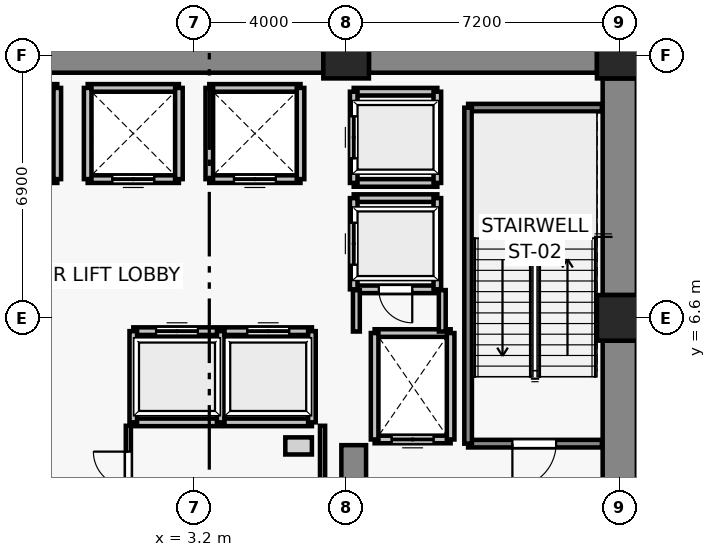
"""IFC4 building model, lengths in metres.
Left out: names, types, materials, properties, quantities, classifications, styles, units other than length and angle.
Written with IfcOpenShell. Run it as: python <this file> out.ifc"""

import sys

from ifc_helpers import new_model, si_unit, direction, frame, frame_2d, origin, origin_2d, place, context, subcontext, project, spatial, rectangle, extrude, source, transform, mapped, element, fill, save


model = new_model("IFC4")
c1 = context("Model", 3, precision=1e-05, world=origin(), true_north=direction((0.0, 1.0)))
c2 = subcontext(c1, "Body", "Model", "MODEL_VIEW")
j1 = project(units=[si_unit("LENGTHUNIT", "METRE"), si_unit("PLANEANGLEUNIT", "RADIAN")], contexts=[c1])
p1 = place(None, origin())
s1 = spatial("IfcSite", under=j1, at=p1, CompositionType="ELEMENT")
p2 = place(p1, origin())
s2 = spatial("IfcBuilding", under=s1, at=p2, CompositionType="ELEMENT")
p3 = place(p2, origin())
s3 = spatial("IfcBuildingStorey", under=s2, at=p3, CompositionType="ELEMENT", Elevation=0.0)
for number, where, z_axis, x_axis in (
    (1, (14.4, 6.6, 0.0), (0.0, 0.0, 1.0), (1.0, 0.0, 0.0)),
    (2, (7.2, 13.5, 0.0), (0.0, 0.0, 1.0), (1.0, 0.0, 0.0)),
    (3, (14.4, 13.5, 0.0), (0.0, 0.0, 1.0), (1.0, 0.0, 0.0)),
):
    element("IfcColumn", number, at=place(p3, frame(where, z_axis=z_axis, x_axis=x_axis)), inside=s3, PredefinedType="COLUMN", context=c2, shape_type="SweptSolid", body=[
        extrude(rectangle(XDim=1.2, YDim=1.2, at=origin_2d()), origin(), (0.0, 0.0, 1.0), 5.0),
    ])
p4 = place(p3, frame((-6.6, 13.5, 0.0), z_axis=(0.0, 0.0, 1.0), x_axis=(1.0, 0.0, 0.0)))
e4 = element("IfcWall", 4, at=p4, inside=s3, PredefinedType="SHEAR", context=c2, shape_type="SweptSolid", body=[
    extrude(rectangle(XDim=13.2, YDim=0.9, at=frame_2d((6.6, 0.0))), origin(), (0.0, 0.0, 1.0), 4.7),
])
p5 = place(p3, frame((7.8, 13.5, 0.0), z_axis=(0.0, 0.0, 1.0), x_axis=(1.0, 0.0, 0.0)))
e5 = element("IfcWall", 5, at=p5, inside=s3, PredefinedType="SHEAR", context=c2, shape_type="SweptSolid", body=[
    extrude(rectangle(XDim=6.0, YDim=0.9, at=frame_2d((3.0, 0.0))), origin(), (0.0, 0.0, 1.0), 4.7),
])
p6 = place(p3, frame((14.4, -0.6, 0.0), z_axis=(0.0, 0.0, 1.0), x_axis=(0.0, 1.0, 0.0)))
e6 = element("IfcWall", 6, at=p6, inside=s3, PredefinedType="SHEAR", context=c2, shape_type="SweptSolid", body=[
    extrude(rectangle(XDim=6.6, YDim=0.9, at=frame_2d((3.3, 0.0))), origin(), (0.0, 0.0, 1.0), 4.7),
])
p7 = place(p3, frame((14.4, 7.2, 0.0), z_axis=(0.0, 0.0, 1.0), x_axis=(0.0, 1.0, 0.0)))
e7 = element("IfcWall", 7, at=p7, inside=s3, PredefinedType="SHEAR", context=c2, shape_type="SweptSolid", body=[
    extrude(rectangle(XDim=5.7, YDim=0.9, at=frame_2d((2.85, 0.0))), origin(), (0.0, 0.0, 1.0), 4.7),
])
p8 = place(p3, frame((7.4, -0.75, 0.0), z_axis=(0.0, 0.0, 1.0), x_axis=(0.0, 1.0, 0.0)))
e8 = element("IfcWall", 8, at=p8, inside=s3, PredefinedType="SHEAR", context=c2, shape_type="SweptSolid", body=[
    extrude(rectangle(XDim=4.0, YDim=0.65, at=frame_2d((2.0, 0.0))), origin(), (0.0, 0.0, 1.0), 4.7),
])
p9 = place(p3, frame((9.95, 3.4, 0.0), z_axis=(0.0, 0.0, 1.0), x_axis=(-1.0, 0.0, 0.0)))
e9 = element("IfcWall", 9, at=p9, inside=s3, PredefinedType="SOLIDWALL", context=c2, shape_type="SweptSolid", body=[
    extrude(rectangle(XDim=2.0, YDim=0.2, at=frame_2d((1.0, 0.0))), origin(), (0.0, 0.0, 1.0), 4.7),
])
p10 = place(p9, frame((0.45, 0.0, 0.0)))
e10 = element("IfcOpeningElement", 10, at=p10, cuts=e9, PredefinedType="OPENING", context=c2, shape_type="SweptSolid", body=[
    extrude(rectangle(XDim=1.1, YDim=2.2, at=frame_2d((0.55, 1.1))), frame((0.0, 0.11, 0.0), z_axis=(0.0, -1.0, 0.0), x_axis=(1.0, 0.0, 0.0)), (0.0, 0.0, 1.0), 0.22),
])
p11 = place(p3, frame((7.95, 6.2, 0.0), z_axis=(0.0, 0.0, 1.0), x_axis=(1.0, 0.0, 0.0)))
e11 = element("IfcWall", 11, at=p11, inside=s3, PredefinedType="SOLIDWALL", context=c2, shape_type="SweptSolid", body=[
    extrude(rectangle(XDim=2.0, YDim=0.2, at=frame_2d((1.0, 0.0))), origin(), (0.0, 0.0, 1.0), 4.7),
])
for number, where, z_axis, x_axis in (
    (12, (7.95, 3.4, 0.0), (0.0, 0.0, 1.0), (0.0, 1.0, 0.0)),
    (13, (9.95, 6.2, 0.0), (0.0, 0.0, 1.0), (0.0, -1.0, 0.0)),
):
    element("IfcWall", number, at=place(p3, frame(where, z_axis=z_axis, x_axis=x_axis)), inside=s3, PredefinedType="SOLIDWALL", context=c2, shape_type="SweptSolid", body=[
        extrude(rectangle(XDim=2.8, YDim=0.2, at=frame_2d((1.4, 0.0))), origin(), (0.0, 0.0, 1.0), 4.7),
    ])
p12 = place(p3, frame((-0.4, 10.25, 0.0), z_axis=(0.0, 0.0, 1.0), x_axis=(-1.0, 0.0, 0.0)))
e14 = element("IfcWall", 14, at=p12, inside=s3, PredefinedType="SOLIDWALL", context=c2, shape_type="SweptSolid", body=[
    extrude(rectangle(XDim=2.4, YDim=0.2, at=frame_2d((1.2, 0.0))), origin(), (0.0, 0.0, 1.0), 4.7),
])
p13 = place(p12, frame((0.65, 0.0, 0.0)))
e15 = element("IfcOpeningElement", 15, at=p13, cuts=e14, PredefinedType="OPENING", context=c2, shape_type="SweptSolid", body=[
    extrude(rectangle(XDim=1.1, YDim=2.2, at=frame_2d((0.55, 1.1))), frame((0.0, 0.11, 0.0), z_axis=(0.0, -1.0, 0.0), x_axis=(1.0, 0.0, 0.0)), (0.0, 0.0, 1.0), 0.22),
])
p14 = place(p3, frame((-2.8, 12.65, 0.0), z_axis=(0.0, 0.0, 1.0), x_axis=(1.0, 0.0, 0.0)))
e16 = element("IfcWall", 16, at=p14, inside=s3, PredefinedType="SOLIDWALL", context=c2, shape_type="SweptSolid", body=[
    extrude(rectangle(XDim=2.4, YDim=0.2, at=frame_2d((1.2, 0.0))), origin(), (0.0, 0.0, 1.0), 4.7),
])
p15 = place(p3, frame((-0.4, 12.65, 0.0), z_axis=(0.0, 0.0, 1.0), x_axis=(0.0, -1.0, 0.0)))
e17 = element("IfcWall", 17, at=p15, inside=s3, PredefinedType="SOLIDWALL", context=c2, shape_type="SweptSolid", body=[
    extrude(rectangle(XDim=2.4, YDim=0.2, at=frame_2d((1.2, 0.0))), origin(), (0.0, 0.0, 1.0), 4.7),
])
p16 = place(p3, frame((2.8, 10.25, 0.0), z_axis=(0.0, 0.0, 1.0), x_axis=(-1.0, 0.0, 0.0)))
e18 = element("IfcWall", 18, at=p16, inside=s3, PredefinedType="SOLIDWALL", context=c2, shape_type="SweptSolid", body=[
    extrude(rectangle(XDim=2.4, YDim=0.2, at=frame_2d((1.2, 0.0))), origin(), (0.0, 0.0, 1.0), 4.7),
])
p17 = place(p16, frame((0.65, 0.0, 0.0)))
e19 = element("IfcOpeningElement", 19, at=p17, cuts=e18, PredefinedType="OPENING", context=c2, shape_type="SweptSolid", body=[
    extrude(rectangle(XDim=1.1, YDim=2.2, at=frame_2d((0.55, 1.1))), frame((0.0, 0.11, 0.0), z_axis=(0.0, -1.0, 0.0), x_axis=(1.0, 0.0, 0.0)), (0.0, 0.0, 1.0), 0.22),
])
p18 = place(p3, frame((0.4, 12.65, 0.0), z_axis=(0.0, 0.0, 1.0), x_axis=(1.0, 0.0, 0.0)))
e20 = element("IfcWall", 20, at=p18, inside=s3, PredefinedType="SOLIDWALL", context=c2, shape_type="SweptSolid", body=[
    extrude(rectangle(XDim=2.4, YDim=0.2, at=frame_2d((1.2, 0.0))), origin(), (0.0, 0.0, 1.0), 4.7),
])
for number, where, z_axis, x_axis in (
    (21, (0.4, 10.25, 0.0), (0.0, 0.0, 1.0), (0.0, 1.0, 0.0)),
    (22, (2.8, 12.65, 0.0), (0.0, 0.0, 1.0), (0.0, -1.0, 0.0)),
):
    element("IfcWall", number, at=place(p3, frame(where, z_axis=z_axis, x_axis=x_axis)), inside=s3, PredefinedType="SOLIDWALL", context=c2, shape_type="SweptSolid", body=[
        extrude(rectangle(XDim=2.4, YDim=0.2, at=frame_2d((1.2, 0.0))), origin(), (0.0, 0.0, 1.0), 4.7),
    ])
p19 = place(p3, frame((6.0, 10.25, 0.0), z_axis=(0.0, 0.0, 1.0), x_axis=(-1.0, 0.0, 0.0)))
e23 = element("IfcWall", 23, at=p19, inside=s3, PredefinedType="SOLIDWALL", context=c2, shape_type="SweptSolid", body=[
    extrude(rectangle(XDim=2.4, YDim=0.2, at=frame_2d((1.2, 0.0))), origin(), (0.0, 0.0, 1.0), 4.7),
])
p20 = place(p19, frame((0.65, 0.0, 0.0)))
e24 = element("IfcOpeningElement", 24, at=p20, cuts=e23, PredefinedType="OPENING", context=c2, shape_type="SweptSolid", body=[
    extrude(rectangle(XDim=1.1, YDim=2.2, at=frame_2d((0.55, 1.1))), frame((0.0, 0.11, 0.0), z_axis=(0.0, -1.0, 0.0), x_axis=(1.0, 0.0, 0.0)), (0.0, 0.0, 1.0), 0.22),
])
for number, where, z_axis, x_axis in (
    (25, (3.6, 12.65, 0.0), (0.0, 0.0, 1.0), (1.0, 0.0, 0.0)),
    (26, (3.6, 10.25, 0.0), (0.0, 0.0, 1.0), (0.0, 1.0, 0.0)),
    (27, (6.0, 12.65, 0.0), (0.0, 0.0, 1.0), (0.0, -1.0, 0.0)),
):
    element("IfcWall", number, at=place(p3, frame(where, z_axis=z_axis, x_axis=x_axis)), inside=s3, PredefinedType="SOLIDWALL", context=c2, shape_type="SweptSolid", body=[
        extrude(rectangle(XDim=2.4, YDim=0.2, at=frame_2d((1.2, 0.0))), origin(), (0.0, 0.0, 1.0), 4.7),
    ])
p21 = place(p3, frame((3.9, 3.85, 0.0), z_axis=(0.0, 0.0, 1.0), x_axis=(-1.0, 0.0, 0.0)))
e28 = element("IfcWall", 28, at=p21, inside=s3, PredefinedType="SOLIDWALL", context=c2, shape_type="SweptSolid", body=[
    extrude(rectangle(XDim=2.3, YDim=0.2, at=frame_2d((1.15, 0.0))), origin(), (0.0, 0.0, 1.0), 4.7),
])
p22 = place(p3, frame((1.6, 6.25, 0.0), z_axis=(0.0, 0.0, 1.0), x_axis=(1.0, 0.0, 0.0)))
e29 = element("IfcWall", 29, at=p22, inside=s3, PredefinedType="SOLIDWALL", context=c2, shape_type="SweptSolid", body=[
    extrude(rectangle(XDim=2.3, YDim=0.2, at=frame_2d((1.15, 0.0))), origin(), (0.0, 0.0, 1.0), 4.7),
])
p23 = place(p22, frame((0.6, 0.0, 0.0)))
e30 = element("IfcOpeningElement", 30, at=p23, cuts=e29, PredefinedType="OPENING", context=c2, shape_type="SweptSolid", body=[
    extrude(rectangle(XDim=1.1, YDim=2.2, at=frame_2d((0.55, 1.1))), frame((0.0, 0.11, 0.0), z_axis=(0.0, -1.0, 0.0), x_axis=(1.0, 0.0, 0.0)), (0.0, 0.0, 1.0), 0.22),
])
for number, where, z_axis, x_axis in (
    (31, (1.6, 3.85, 0.0), (0.0, 0.0, 1.0), (0.0, 1.0, 0.0)),
    (32, (3.9, 6.25, 0.0), (0.0, 0.0, 1.0), (0.0, -1.0, 0.0)),
):
    element("IfcWall", number, at=place(p3, frame(where, z_axis=z_axis, x_axis=x_axis)), inside=s3, PredefinedType="SOLIDWALL", context=c2, shape_type="SweptSolid", body=[
        extrude(rectangle(XDim=2.4, YDim=0.2, at=frame_2d((1.2, 0.0))), origin(), (0.0, 0.0, 1.0), 4.7),
    ])
p24 = place(p3, frame((6.3, 3.85, 0.0), z_axis=(0.0, 0.0, 1.0), x_axis=(-1.0, 0.0, 0.0)))
e33 = element("IfcWall", 33, at=p24, inside=s3, PredefinedType="SOLIDWALL", context=c2, shape_type="SweptSolid", body=[
    extrude(rectangle(XDim=2.3, YDim=0.2, at=frame_2d((1.15, 0.0))), origin(), (0.0, 0.0, 1.0), 4.7),
])
p25 = place(p3, frame((4.0, 6.25, 0.0), z_axis=(0.0, 0.0, 1.0), x_axis=(1.0, 0.0, 0.0)))
e34 = element("IfcWall", 34, at=p25, inside=s3, PredefinedType="SOLIDWALL", context=c2, shape_type="SweptSolid", body=[
    extrude(rectangle(XDim=2.3, YDim=0.2, at=frame_2d((1.15, 0.0))), origin(), (0.0, 0.0, 1.0), 4.7),
])
p26 = place(p25, frame((0.6, 0.0, 0.0)))
e35 = element("IfcOpeningElement", 35, at=p26, cuts=e34, PredefinedType="OPENING", context=c2, shape_type="SweptSolid", body=[
    extrude(rectangle(XDim=1.1, YDim=2.2, at=frame_2d((0.55, 1.1))), frame((0.0, 0.11, 0.0), z_axis=(0.0, -1.0, 0.0), x_axis=(1.0, 0.0, 0.0)), (0.0, 0.0, 1.0), 0.22),
])
p27 = place(p3, frame((6.3, 6.25, 0.0), z_axis=(0.0, 0.0, 1.0), x_axis=(0.0, -1.0, 0.0)))
e36 = element("IfcWall", 36, at=p27, inside=s3, PredefinedType="SOLIDWALL", context=c2, shape_type="SweptSolid", body=[
    extrude(rectangle(XDim=2.4, YDim=0.2, at=frame_2d((1.2, 0.0))), origin(), (0.0, 0.0, 1.0), 4.7),
])
p28 = place(p3, frame((9.6, 7.35, 0.0), z_axis=(0.0, 0.0, 1.0), x_axis=(-1.0, 0.0, 0.0)))
e37 = element("IfcWall", 37, at=p28, inside=s3, PredefinedType="SOLIDWALL", context=c2, shape_type="SweptSolid", body=[
    extrude(rectangle(XDim=2.2, YDim=0.2, at=frame_2d((1.1, 0.0))), origin(), (0.0, 0.0, 1.0), 3.79),
])
p29 = place(p28, frame((0.66, 0.0, 0.0)))
e38 = element("IfcOpeningElement", 38, at=p29, cuts=e37, PredefinedType="OPENING", context=c2, shape_type="SweptSolid", body=[
    extrude(rectangle(XDim=0.88, YDim=2.1, at=frame_2d((0.44, 1.05))), frame((0.0, 0.11, 0.0), z_axis=(0.0, -1.0, 0.0), x_axis=(1.0, 0.0, 0.0)), (0.0, 0.0, 1.0), 0.22),
])
p30 = place(p3, frame((7.4, 9.75, 0.0), z_axis=(0.0, 0.0, 1.0), x_axis=(1.0, 0.0, 0.0)))
e39 = element("IfcWall", 39, at=p30, inside=s3, PredefinedType="SOLIDWALL", context=c2, shape_type="SweptSolid", body=[
    extrude(rectangle(XDim=2.2, YDim=0.2, at=frame_2d((1.1, 0.0))), origin(), (0.0, 0.0, 1.0), 3.79),
])
p31 = place(p3, frame((7.4, 7.35, 0.0), z_axis=(0.0, 0.0, 1.0), x_axis=(0.0, 1.0, 0.0)))
e40 = element("IfcWall", 40, at=p31, inside=s3, PredefinedType="SOLIDWALL", context=c2, shape_type="SweptSolid", body=[
    extrude(rectangle(XDim=2.4, YDim=0.2, at=frame_2d((1.2, 0.0))), origin(), (0.0, 0.0, 1.0), 3.79),
])
p32 = place(p31, frame((0.65, 0.0, 0.0)))
e41 = element("IfcOpeningElement", 41, at=p32, cuts=e40, PredefinedType="OPENING", context=c2, shape_type="SweptSolid", body=[
    extrude(rectangle(XDim=1.1, YDim=2.2, at=frame_2d((0.55, 1.1))), frame((0.0, 0.11, 0.0), z_axis=(0.0, -1.0, 0.0), x_axis=(1.0, 0.0, 0.0)), (0.0, 0.0, 1.0), 0.22),
])
p33 = place(p3, frame((9.6, 9.75, 0.0), z_axis=(0.0, 0.0, 1.0), x_axis=(0.0, -1.0, 0.0)))
e42 = element("IfcWall", 42, at=p33, inside=s3, PredefinedType="SOLIDWALL", context=c2, shape_type="SweptSolid", body=[
    extrude(rectangle(XDim=2.4, YDim=0.2, at=frame_2d((1.2, 0.0))), origin(), (0.0, 0.0, 1.0), 4.7),
])
for number, where, z_axis, x_axis in (
    (43, (9.6, 10.15, 0.0), (0.0, 0.0, 1.0), (-1.0, 0.0, 0.0)),
    (44, (7.4, 12.55, 0.0), (0.0, 0.0, 1.0), (1.0, 0.0, 0.0)),
):
    element("IfcWall", number, at=place(p3, frame(where, z_axis=z_axis, x_axis=x_axis)), inside=s3, PredefinedType="SOLIDWALL", context=c2, shape_type="SweptSolid", body=[
        extrude(rectangle(XDim=2.2, YDim=0.2, at=frame_2d((1.1, 0.0))), origin(), (0.0, 0.0, 1.0), 3.79),
    ])
p34 = place(p3, frame((7.4, 10.15, 0.0), z_axis=(0.0, 0.0, 1.0), x_axis=(0.0, 1.0, 0.0)))
e45 = element("IfcWall", 45, at=p34, inside=s3, PredefinedType="SOLIDWALL", context=c2, shape_type="SweptSolid", body=[
    extrude(rectangle(XDim=2.4, YDim=0.2, at=frame_2d((1.2, 0.0))), origin(), (0.0, 0.0, 1.0), 3.79),
])
p35 = place(p34, frame((0.65, 0.0, 0.0)))
e46 = element("IfcOpeningElement", 46, at=p35, cuts=e45, PredefinedType="OPENING", context=c2, shape_type="SweptSolid", body=[
    extrude(rectangle(XDim=1.1, YDim=2.2, at=frame_2d((0.55, 1.1))), frame((0.0, 0.11, 0.0), z_axis=(0.0, -1.0, 0.0), x_axis=(1.0, 0.0, 0.0)), (0.0, 0.0, 1.0), 0.22),
])
p36 = place(p3, frame((9.6, 12.55, 0.0), z_axis=(0.0, 0.0, 1.0), x_axis=(0.0, -1.0, 0.0)))
e47 = element("IfcWall", 47, at=p36, inside=s3, PredefinedType="SOLIDWALL", context=c2, shape_type="SweptSolid", body=[
    extrude(rectangle(XDim=2.4, YDim=0.2, at=frame_2d((1.2, 0.0))), origin(), (0.0, 0.0, 1.0), 4.7),
])
p37 = place(p3, frame((13.93, 3.29, 0.0), z_axis=(0.0, 0.0, 1.0), x_axis=(-1.0, 0.0, 0.0)))
e48 = element("IfcWall", 48, at=p37, inside=s3, PredefinedType="SOLIDWALL", context=c2, shape_type="SweptSolid", body=[
    extrude(rectangle(XDim=3.52, YDim=0.2, at=frame_2d((1.76, 0.0))), origin(), (0.0, 0.0, 1.0), 4.7),
])
p38 = place(p37, frame((1.205, 0.0, 0.0)))
e49 = element("IfcOpeningElement", 49, at=p38, cuts=e48, PredefinedType="OPENING", context=c2, shape_type="SweptSolid", body=[
    extrude(rectangle(XDim=1.15, YDim=2.15, at=frame_2d((0.575, 1.075))), frame((0.0, 0.11, 0.0), z_axis=(0.0, -1.0, 0.0), x_axis=(1.0, 0.0, 0.0)), (0.0, 0.0, 1.0), 0.22),
])
p39 = place(p3, frame((10.41, 12.13, 0.0), z_axis=(0.0, 0.0, 1.0), x_axis=(1.0, 0.0, 0.0)))
e50 = element("IfcWall", 50, at=p39, inside=s3, PredefinedType="SOLIDWALL", context=c2, shape_type="SweptSolid", body=[
    extrude(rectangle(XDim=3.52, YDim=0.2, at=frame_2d((1.76, 0.0))), origin(), (0.0, 0.0, 1.0), 4.7),
])
p40 = place(p3, frame((10.41, 3.29, 0.0), z_axis=(0.0, 0.0, 1.0), x_axis=(0.0, 1.0, 0.0)))
e51 = element("IfcWall", 51, at=p40, inside=s3, PredefinedType="SOLIDWALL", context=c2, shape_type="SweptSolid", body=[
    extrude(rectangle(XDim=8.84, YDim=0.2, at=frame_2d((4.42, 0.0))), origin(), (0.0, 0.0, 1.0), 4.7),
])
p41 = place(p3, frame((7.47, 6.24, 0.0), z_axis=(0.0, 0.0, 1.0), x_axis=(0.0, 1.0, 0.0)))
e52 = element("IfcWall", 52, at=p41, inside=s3, PredefinedType="PARTITIONING", context=c2, shape_type="SweptSolid", body=[
    extrude(rectangle(XDim=1.09, YDim=0.18, at=frame_2d((0.545, 0.0))), origin(), (0.0, 0.0, 1.0), 3.79),
])
p42 = place(p3, frame((9.73, 7.33, 0.0), z_axis=(0.0, 0.0, 1.0), x_axis=(0.0, -1.0, 0.0)))
e53 = element("IfcWall", 53, at=p42, inside=s3, PredefinedType="PARTITIONING", context=c2, shape_type="SweptSolid", body=[
    extrude(rectangle(XDim=1.09, YDim=0.18, at=frame_2d((0.545, 0.0))), origin(), (0.0, 0.0, 1.0), 4.7),
])
p43 = place(p3, frame((1.47, 1.48, 0.0), z_axis=(0.0, 0.0, 1.0), x_axis=(0.0, 1.0, 0.0)))
e54 = element("IfcWall", 54, at=p43, inside=s3, PredefinedType="PARTITIONING", context=c2, shape_type="SweptSolid", body=[
    extrude(rectangle(XDim=2.28, YDim=0.135, at=frame_2d((1.14, 0.0))), origin(), (0.0, 0.0, 1.0), 4.073),
])
p44 = place(p43, frame((0.68, 0.0, 0.0)))
e55 = element("IfcOpeningElement", 55, at=p44, cuts=e54, PredefinedType="OPENING", context=c2, shape_type="SweptSolid", body=[
    extrude(rectangle(XDim=0.92, YDim=2.1, at=frame_2d((0.46, 1.05))), frame((0.0, 0.077, 0.0), z_axis=(0.0, -1.0, 0.0), x_axis=(1.0, 0.0, 0.0)), (0.0, 0.0, 1.0), 0.155),
])
p45 = place(p3, frame((6.58, 3.76, 0.0), z_axis=(0.0, 0.0, 1.0), x_axis=(0.0, -1.0, 0.0)))
e56 = element("IfcWall", 56, at=p45, inside=s3, PredefinedType="PARTITIONING", context=c2, shape_type="SweptSolid", body=[
    extrude(rectangle(XDim=2.28, YDim=0.135, at=frame_2d((1.14, 0.0))), origin(), (0.0, 0.0, 1.0), 4.073),
])
m1 = source(origin(), c2, "Body", "SweptSolid", [
    extrude(rectangle(XDim=1.1, YDim=2.2, at=frame_2d((0.55, 1.1))), frame((0.0, 0.025, 0.0), z_axis=(0.0, -1.0, 0.0), x_axis=(1.0, 0.0, 0.0)), (0.0, 0.0, 1.0), 0.05),
])
p46 = place(p10, origin())
e57 = element("IfcDoor", 57, at=p46, inside=s3, OperationType="DOUBLE_DOOR_SLIDING", PredefinedType="DOOR", context=c2, shape_type="MappedRepresentation", body=[
    mapped(m1, transform((0.0, 0.0, 0.0), x_axis=(1.0, 0.0, 0.0), y_axis=(0.0, 1.0, 0.0), z_axis=(0.0, 0.0, 1.0), scale=1.0)),
])
fill(e10, e57)
p47 = place(p17, origin())
e58 = element("IfcDoor", 58, at=p47, inside=s3, OperationType="DOUBLE_DOOR_SLIDING", PredefinedType="DOOR", context=c2, shape_type="MappedRepresentation", body=[
    mapped(m1, transform((0.0, 0.0, 0.0), x_axis=(1.0, 0.0, 0.0), y_axis=(0.0, 1.0, 0.0), z_axis=(0.0, 0.0, 1.0), scale=1.0)),
])
fill(e19, e58)
p48 = place(p20, origin())
e59 = element("IfcDoor", 59, at=p48, inside=s3, OperationType="DOUBLE_DOOR_SLIDING", PredefinedType="DOOR", context=c2, shape_type="MappedRepresentation", body=[
    mapped(m1, transform((0.0, 0.0, 0.0), x_axis=(1.0, 0.0, 0.0), y_axis=(0.0, 1.0, 0.0), z_axis=(0.0, 0.0, 1.0), scale=1.0)),
])
fill(e24, e59)
p49 = place(p23, origin())
e60 = element("IfcDoor", 60, at=p49, inside=s3, OperationType="DOUBLE_DOOR_SLIDING", PredefinedType="DOOR", context=c2, shape_type="MappedRepresentation", body=[
    mapped(m1, transform((0.0, 0.0, 0.0), x_axis=(1.0, 0.0, 0.0), y_axis=(0.0, 1.0, 0.0), z_axis=(0.0, 0.0, 1.0), scale=1.0)),
])
fill(e30, e60)
p50 = place(p26, origin())
e61 = element("IfcDoor", 61, at=p50, inside=s3, OperationType="DOUBLE_DOOR_SLIDING", PredefinedType="DOOR", context=c2, shape_type="MappedRepresentation", body=[
    mapped(m1, transform((0.0, 0.0, 0.0), x_axis=(1.0, 0.0, 0.0), y_axis=(0.0, 1.0, 0.0), z_axis=(0.0, 0.0, 1.0), scale=1.0)),
])
fill(e35, e61)
p51 = place(p32, origin())
e62 = element("IfcDoor", 62, at=p51, inside=s3, OperationType="DOUBLE_DOOR_SLIDING", PredefinedType="DOOR", context=c2, shape_type="MappedRepresentation", body=[
    mapped(m1, transform((0.0, 0.0, 0.0), x_axis=(1.0, 0.0, 0.0), y_axis=(0.0, 1.0, 0.0), z_axis=(0.0, 0.0, 1.0), scale=1.0)),
])
fill(e41, e62)
p52 = place(p35, origin())
e63 = element("IfcDoor", 63, at=p52, inside=s3, OperationType="DOUBLE_DOOR_SLIDING", PredefinedType="DOOR", context=c2, shape_type="MappedRepresentation", body=[
    mapped(m1, transform((0.0, 0.0, 0.0), x_axis=(1.0, 0.0, 0.0), y_axis=(0.0, 1.0, 0.0), z_axis=(0.0, 0.0, 1.0), scale=1.0)),
])
fill(e46, e63)
m2 = source(origin(), c2, "Body", "SweptSolid", [
    extrude(rectangle(XDim=1.15, YDim=2.15, at=frame_2d((0.575, 1.075))), frame((0.0, 0.025, 0.0), z_axis=(0.0, -1.0, 0.0), x_axis=(1.0, 0.0, 0.0)), (0.0, 0.0, 1.0), 0.05),
])
p53 = place(p38, origin())
e64 = element("IfcDoor", 64, at=p53, inside=s3, OperationType="SINGLE_SWING_RIGHT", PredefinedType="DOOR", context=c2, shape_type="MappedRepresentation", body=[
    mapped(m2, transform((0.0, 0.0, 0.0), x_axis=(1.0, 0.0, 0.0), y_axis=(0.0, 1.0, 0.0), z_axis=(0.0, 0.0, 1.0), scale=1.0)),
])
fill(e49, e64)
m3 = source(origin(), c2, "Body", "SweptSolid", [
    extrude(rectangle(XDim=0.92, YDim=2.1, at=frame_2d((0.46, 1.05))), frame((0.0, 0.025, 0.0), z_axis=(0.0, -1.0, 0.0), x_axis=(1.0, 0.0, 0.0)), (0.0, 0.0, 1.0), 0.05),
])
p54 = place(p44, origin())
e65 = element("IfcDoor", 65, at=p54, inside=s3, OperationType="SINGLE_SWING_RIGHT", PredefinedType="DOOR", context=c2, shape_type="MappedRepresentation", body=[
    mapped(m3, transform((0.0, 0.0, 0.0), x_axis=(1.0, 0.0, 0.0), y_axis=(0.0, 1.0, 0.0), z_axis=(0.0, 0.0, 1.0), scale=1.0)),
])
fill(e55, e65)
m4 = source(origin(), c2, "Body", "SweptSolid", [
    extrude(rectangle(XDim=0.88, YDim=2.1, at=frame_2d((0.44, 1.05))), frame((0.0, 0.025, 0.0), z_axis=(0.0, -1.0, 0.0), x_axis=(1.0, 0.0, 0.0)), (0.0, 0.0, 1.0), 0.05),
])
p55 = place(p29, origin())
e66 = element("IfcDoor", 66, at=p55, inside=s3, OperationType="SINGLE_SWING_LEFT", PredefinedType="DOOR", context=c2, shape_type="MappedRepresentation", body=[
    mapped(m4, transform((0.0, 0.0, 0.0), x_axis=(1.0, 0.0, 0.0), y_axis=(0.0, 1.0, 0.0), z_axis=(0.0, 0.0, 1.0), scale=1.0)),
])
fill(e38, e66)
save(model, sys.argv[1])
